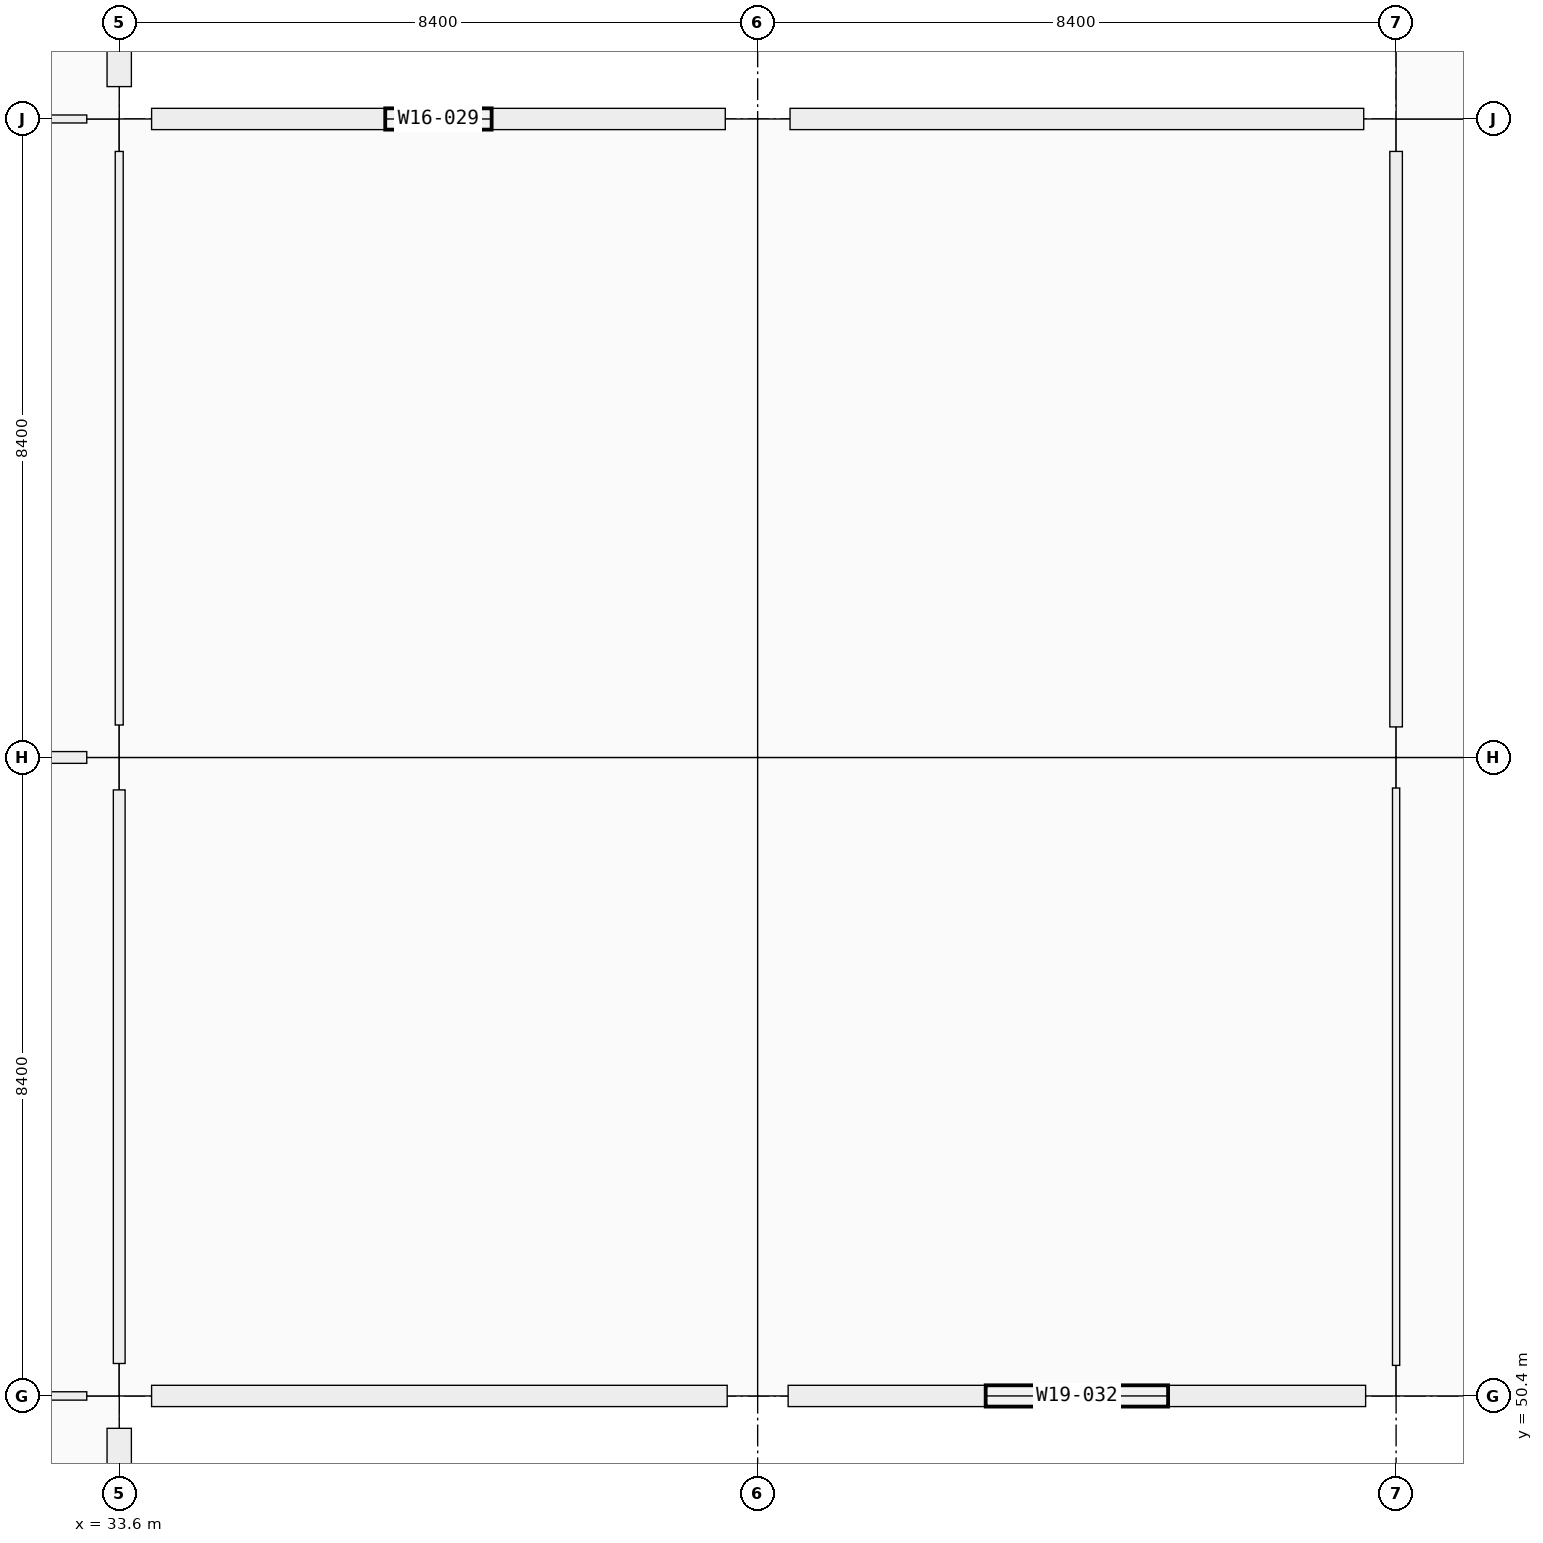
"""IFC4 building model, lengths in metres.
Left out: names, types, materials, properties, quantities, classifications, styles, units other than length and angle.
Written with IfcOpenShell. Run it as: python <this file> out.ifc"""

import sys

from ifc_helpers import new_model, si_unit, direction, frame, frame_2d, origin, origin_2d, place, context, subcontext, project, spatial, rectangle, extrude, element, fill, save


model = new_model("IFC4")
c1 = context("Model", 3, precision=1e-05, world=origin(), true_north=direction((0.0, 1.0)))
c2 = subcontext(c1, "Body", "Model", "MODEL_VIEW")
j1 = project(units=[si_unit("LENGTHUNIT", "METRE"), si_unit("PLANEANGLEUNIT", "RADIAN")], contexts=[c1])
p1 = place(None, origin())
s1 = spatial("IfcSite", under=j1, at=p1, CompositionType="ELEMENT")
p2 = place(p1, origin())
s2 = spatial("IfcBuilding", under=s1, at=p2, CompositionType="ELEMENT")
p3 = place(p2, origin())
s3 = spatial("IfcBuildingStorey", under=s2, at=p3, CompositionType="ELEMENT", Elevation=0.0)
for number, where, z_axis, x_axis in (
    (1, (33.6, 50.4, 0.0), (0.0, 0.0, 1.0), (1.0, 0.0, 0.0)),
    (2, (33.6, 58.8, 0.0), (0.0, 0.0, 1.0), (1.0, 0.0, 0.0)),
    (3, (33.6, 67.2, 0.0), (0.0, 0.0, 1.0), (1.0, 0.0, 0.0)),
):
    element("IfcColumn", number, at=place(p3, frame(where, z_axis=z_axis, x_axis=x_axis)), inside=s3, PredefinedType="COLUMN", context=c2, shape_type="SweptSolid", body=[
        extrude(rectangle(XDim=0.85, YDim=0.85, at=origin_2d()), origin(), (0.0, 0.0, 1.0), 5.76),
    ])
for number, where, z_axis, x_axis in (
    (4, (42.0, 50.4, 0.0), (0.0, 0.0, 1.0), (1.0, 0.0, 0.0)),
    (5, (42.0, 58.8, 0.0), (0.0, 0.0, 1.0), (1.0, 0.0, 0.0)),
):
    element("IfcColumn", number, at=place(p3, frame(where, z_axis=z_axis, x_axis=x_axis)), inside=s3, PredefinedType="COLUMN", context=c2, shape_type="SweptSolid", body=[
        extrude(rectangle(XDim=0.8, YDim=0.8, at=origin_2d()), origin(), (0.0, 0.0, 1.0), 5.76),
    ])
p4 = place(p3, frame((42.0, 67.2, 0.0), z_axis=(0.0, 0.0, 1.0), x_axis=(1.0, 0.0, 0.0)))
e6 = element("IfcColumn", 6, at=p4, inside=s3, PredefinedType="COLUMN", context=c2, shape_type="SweptSolid", body=[
    extrude(rectangle(XDim=0.85, YDim=0.85, at=origin_2d()), origin(), (0.0, 0.0, 1.0), 5.76),
])
for number, where, z_axis, x_axis in (
    (7, (50.4, 50.4, 0.0), (0.0, 0.0, 1.0), (1.0, 0.0, 0.0)),
    (8, (50.4, 58.8, 0.0), (0.0, 0.0, 1.0), (1.0, 0.0, 0.0)),
):
    element("IfcColumn", number, at=place(p3, frame(where, z_axis=z_axis, x_axis=x_axis)), inside=s3, PredefinedType="COLUMN", context=c2, shape_type="SweptSolid", body=[
        extrude(rectangle(XDim=0.8, YDim=0.8, at=origin_2d()), origin(), (0.0, 0.0, 1.0), 5.76),
    ])
p5 = place(p3, frame((50.4, 67.2, 0.0), z_axis=(0.0, 0.0, 1.0), x_axis=(1.0, 0.0, 0.0)))
e9 = element("IfcColumn", 9, at=p5, inside=s3, PredefinedType="COLUMN", context=c2, shape_type="SweptSolid", body=[
    extrude(rectangle(XDim=0.85, YDim=0.85, at=origin_2d()), origin(), (0.0, 0.0, 1.0), 5.76),
])
p6 = place(p3, frame((33.6, 49.974, 0.0), z_axis=(0.0, 0.0, 1.0), x_axis=(0.0, -1.0, 0.0)))
e10 = element("IfcWall", 10, at=p6, inside=s3, PredefinedType="SOLIDWALL", context=c2, shape_type="SweptSolid", body=[
    extrude(rectangle(XDim=7.548, YDim=0.32, at=frame_2d((3.774, 0.0))), origin(), (0.0, 0.0, 1.0), 4.7),
])
p7 = place(p6, frame((2.674, 0.0, 0.9)))
e11 = element("IfcOpeningElement", 11, at=p7, cuts=e10, PredefinedType="OPENING", context=c2, shape_type="SweptSolid", body=[
    extrude(rectangle(XDim=2.2, YDim=1.75, at=frame_2d((1.1, 0.875))), frame((0.0, 0.16, 0.0), z_axis=(0.0, -1.0, 0.0), x_axis=(1.0, 0.0, 0.0)), (0.0, 0.0, 1.0), 0.32),
])
p8 = place(p3, frame((33.6, 75.174, 0.0), z_axis=(0.0, 0.0, 1.0), x_axis=(0.0, -1.0, 0.0)))
e12 = element("IfcWall", 12, at=p8, inside=s3, PredefinedType="SOLIDWALL", context=c2, shape_type="SweptSolid", body=[
    extrude(rectangle(XDim=7.548, YDim=0.32, at=frame_2d((3.774, 0.0))), origin(), (0.0, 0.0, 1.0), 4.7),
])
p9 = place(p8, frame((2.824, 0.0, 0.9)))
e13 = element("IfcOpeningElement", 13, at=p9, cuts=e12, PredefinedType="OPENING", context=c2, shape_type="SweptSolid", body=[
    extrude(rectangle(XDim=1.9, YDim=1.75, at=frame_2d((0.95, 0.875))), frame((0.0, 0.16, 0.0), z_axis=(0.0, -1.0, 0.0), x_axis=(1.0, 0.0, 0.0)), (0.0, 0.0, 1.0), 0.32),
])
p10 = place(p3, frame((41.599, 50.4, 0.0), z_axis=(0.0, 0.0, 1.0), x_axis=(-1.0, 0.0, 0.0)))
e14 = element("IfcWall", 14, at=p10, inside=s3, PredefinedType="SOLIDWALL", context=c2, shape_type="SweptSolid", body=[
    extrude(rectangle(XDim=7.573, YDim=0.28, at=frame_2d((3.787, 0.0))), origin(), (0.0, 0.0, 1.0), 4.7),
])
p11 = place(p3, frame((34.026, 67.2, 0.0), z_axis=(0.0, 0.0, 1.0), x_axis=(1.0, 0.0, 0.0)))
e15 = element("IfcWall", 15, at=p11, inside=s3, PredefinedType="SOLIDWALL", context=c2, shape_type="SweptSolid", body=[
    extrude(rectangle(XDim=7.548, YDim=0.28, at=frame_2d((3.774, 0.0))), origin(), (0.0, 0.0, 1.0), 4.7),
])
p12 = place(p11, frame((3.074, 0.0, 0.9)))
e16 = element("IfcOpeningElement", 16, at=p12, cuts=e15, PredefinedType="OPENING", context=c2, shape_type="SweptSolid", body=[
    extrude(rectangle(XDim=1.4, YDim=1.75, at=frame_2d((0.7, 0.875))), frame((0.0, 0.14, 0.0), z_axis=(0.0, -1.0, 0.0), x_axis=(1.0, 0.0, 0.0)), (0.0, 0.0, 1.0), 0.28),
])
p13 = place(p3, frame((49.999, 50.4, 0.0), z_axis=(0.0, 0.0, 1.0), x_axis=(-1.0, 0.0, 0.0)))
e17 = element("IfcWall", 17, at=p13, inside=s3, PredefinedType="SOLIDWALL", context=c2, shape_type="SweptSolid", body=[
    extrude(rectangle(XDim=7.598, YDim=0.28, at=frame_2d((3.799, 0.0))), origin(), (0.0, 0.0, 1.0), 4.7),
])
p14 = place(p13, frame((2.599, 0.0, 0.9)))
e18 = element("IfcOpeningElement", 18, at=p14, cuts=e17, PredefinedType="OPENING", context=c2, shape_type="SweptSolid", body=[
    extrude(rectangle(XDim=2.4, YDim=2.25, at=frame_2d((1.2, 1.125))), frame((0.0, 0.14, 0.0), z_axis=(0.0, -1.0, 0.0), x_axis=(1.0, 0.0, 0.0)), (0.0, 0.0, 1.0), 0.28),
])
p15 = place(p3, frame((42.426, 67.2, 0.0), z_axis=(0.0, 0.0, 1.0), x_axis=(1.0, 0.0, 0.0)))
e19 = element("IfcWall", 19, at=p15, inside=s3, PredefinedType="SOLIDWALL", context=c2, shape_type="SweptSolid", body=[
    extrude(rectangle(XDim=7.548, YDim=0.28, at=frame_2d((3.774, 0.0))), origin(), (0.0, 0.0, 1.0), 4.7),
])
p16 = place(p15, frame((2.774, 0.0, 0.9)))
e20 = element("IfcOpeningElement", 20, at=p16, cuts=e19, PredefinedType="OPENING", context=c2, shape_type="SweptSolid", body=[
    extrude(rectangle(XDim=2.0, YDim=2.25, at=frame_2d((1.0, 1.125))), frame((0.0, 0.14, 0.0), z_axis=(0.0, -1.0, 0.0), x_axis=(1.0, 0.0, 0.0)), (0.0, 0.0, 1.0), 0.28),
])
p17 = place(p3, frame((25.627, 50.4, 0.0), z_axis=(0.0, 0.0, 1.0), x_axis=(1.0, 0.0, 0.0)))
e21 = element("IfcWall", 21, at=p17, inside=s3, PredefinedType="MOVABLE", context=c2, shape_type="SweptSolid", body=[
    extrude(rectangle(XDim=7.546, YDim=0.11, at=frame_2d((3.773, 0.0))), origin(), (0.0, 0.0, 1.0), 3.66),
])
p18 = place(p17, frame((3.233, 0.0, 0.0)))
e22 = element("IfcOpeningElement", 22, at=p18, cuts=e21, PredefinedType="OPENING", context=c2, shape_type="SweptSolid", body=[
    extrude(rectangle(XDim=1.08, YDim=2.25, at=frame_2d((0.54, 1.125))), frame((0.0, 0.055, 0.0), z_axis=(0.0, -1.0, 0.0), x_axis=(1.0, 0.0, 0.0)), (0.0, 0.0, 1.0), 0.11),
])
p19 = place(p3, frame((25.627, 58.8, 0.0), z_axis=(0.0, 0.0, 1.0), x_axis=(1.0, 0.0, 0.0)))
e23 = element("IfcWall", 23, at=p19, inside=s3, PredefinedType="PARTITIONING", context=c2, shape_type="SweptSolid", body=[
    extrude(rectangle(XDim=7.546, YDim=0.155, at=frame_2d((3.773, 0.0))), origin(), (0.0, 0.0, 1.0), 3.66),
])
p20 = place(p19, frame((3.243, 0.0, 0.0)))
e24 = element("IfcOpeningElement", 24, at=p20, cuts=e23, PredefinedType="OPENING", context=c2, shape_type="SweptSolid", body=[
    extrude(rectangle(XDim=1.06, YDim=2.25, at=frame_2d((0.53, 1.125))), frame((0.0, 0.078, 0.0), z_axis=(0.0, -1.0, 0.0), x_axis=(1.0, 0.0, 0.0)), (0.0, 0.0, 1.0), 0.155),
])
p21 = place(p3, frame((25.627, 67.2, 0.0), z_axis=(0.0, 0.0, 1.0), x_axis=(1.0, 0.0, 0.0)))
e25 = element("IfcWall", 25, at=p21, inside=s3, PredefinedType="PARTITIONING", context=c2, shape_type="SweptSolid", body=[
    extrude(rectangle(XDim=7.546, YDim=0.105, at=frame_2d((3.773, 0.0))), origin(), (0.0, 0.0, 1.0), 3.66),
])
p22 = place(p21, frame((3.248, 0.0, 0.0)))
e26 = element("IfcOpeningElement", 26, at=p22, cuts=e25, PredefinedType="OPENING", context=c2, shape_type="SweptSolid", body=[
    extrude(rectangle(XDim=1.05, YDim=2.12, at=frame_2d((0.525, 1.06))), frame((0.0, 0.052, 0.0), z_axis=(0.0, -1.0, 0.0), x_axis=(1.0, 0.0, 0.0)), (0.0, 0.0, 1.0), 0.105),
])
p23 = place(p3, frame((33.6, 50.827, 0.0), z_axis=(0.0, 0.0, 1.0), x_axis=(0.0, 1.0, 0.0)))
e27 = element("IfcWall", 27, at=p23, inside=s3, PredefinedType="PARTITIONING", context=c2, shape_type="SweptSolid", body=[
    extrude(rectangle(XDim=7.546, YDim=0.155, at=frame_2d((3.773, 0.0))), origin(), (0.0, 0.0, 1.0), 3.66),
])
p24 = place(p23, frame((3.048, 0.0, 0.0)))
e28 = element("IfcOpeningElement", 28, at=p24, cuts=e27, PredefinedType="OPENING", context=c2, shape_type="SweptSolid", body=[
    extrude(rectangle(XDim=1.45, YDim=2.2, at=frame_2d((0.725, 1.1))), frame((0.0, 0.078, 0.0), z_axis=(0.0, -1.0, 0.0), x_axis=(1.0, 0.0, 0.0)), (0.0, 0.0, 1.0), 0.155),
])
p25 = place(p3, frame((33.6, 59.227, 0.0), z_axis=(0.0, 0.0, 1.0), x_axis=(0.0, 1.0, 0.0)))
e29 = element("IfcWall", 29, at=p25, inside=s3, PredefinedType="PARTITIONING", context=c2, shape_type="SweptSolid", body=[
    extrude(rectangle(XDim=7.546, YDim=0.105, at=frame_2d((3.773, 0.0))), origin(), (0.0, 0.0, 1.0), 3.66),
])
p26 = place(p25, frame((3.073, 0.0, 0.0)))
e30 = element("IfcOpeningElement", 30, at=p26, cuts=e29, PredefinedType="OPENING", context=c2, shape_type="SweptSolid", body=[
    extrude(rectangle(XDim=1.4, YDim=2.25, at=frame_2d((0.7, 1.125))), frame((0.0, 0.052, 0.0), z_axis=(0.0, -1.0, 0.0), x_axis=(1.0, 0.0, 0.0)), (0.0, 0.0, 1.0), 0.105),
])
p27 = place(p3, frame((50.4, 50.802, 0.0), z_axis=(0.0, 0.0, 1.0), x_axis=(0.0, 1.0, 0.0)))
e31 = element("IfcWall", 31, at=p27, inside=s3, PredefinedType="PARTITIONING", context=c2, shape_type="SweptSolid", body=[
    extrude(rectangle(XDim=7.596, YDim=0.095, at=frame_2d((3.798, 0.0))), origin(), (0.0, 0.0, 1.0), 3.66),
])
p28 = place(p27, frame((3.123, 0.0, 0.0)))
e32 = element("IfcOpeningElement", 32, at=p28, cuts=e31, PredefinedType="OPENING", context=c2, shape_type="SweptSolid", body=[
    extrude(rectangle(XDim=1.35, YDim=2.2, at=frame_2d((0.675, 1.1))), frame((0.0, 0.047, 0.0), z_axis=(0.0, -1.0, 0.0), x_axis=(1.0, 0.0, 0.0)), (0.0, 0.0, 1.0), 0.095),
])
p29 = place(p3, frame((50.4, 59.202, 0.0), z_axis=(0.0, 0.0, 1.0), x_axis=(0.0, 1.0, 0.0)))
e33 = element("IfcWall", 33, at=p29, inside=s3, PredefinedType="PARTITIONING", context=c2, shape_type="SweptSolid", body=[
    extrude(rectangle(XDim=7.571, YDim=0.165, at=frame_2d((3.786, 0.0))), origin(), (0.0, 0.0, 1.0), 3.66),
])
p30 = place(p29, frame((2.885, 0.0, 0.0)))
e34 = element("IfcOpeningElement", 34, at=p30, cuts=e33, PredefinedType="OPENING", context=c2, shape_type="SweptSolid", body=[
    extrude(rectangle(XDim=1.8, YDim=2.4, at=frame_2d((0.9, 1.2))), frame((0.0, 0.083, 0.0), z_axis=(0.0, -1.0, 0.0), x_axis=(1.0, 0.0, 0.0)), (0.0, 0.0, 1.0), 0.165),
])
p31 = place(p12, origin())
e35 = element("IfcWindow", 35, at=p31, inside=s3, PartitioningType="SINGLE_PANEL", PredefinedType="WINDOW", context=c2, shape_type="SweptSolid", body=[
    extrude(rectangle(XDim=1.4, YDim=1.75, at=frame_2d((0.7, 0.875))), frame((0.0, 0.03, 0.0), z_axis=(0.0, -1.0, 0.0), x_axis=(1.0, 0.0, 0.0)), (0.0, 0.0, 1.0), 0.06),
])
fill(e16, e35)
p32 = place(p14, origin())
e36 = element("IfcWindow", 36, at=p32, inside=s3, PartitioningType="SINGLE_PANEL", PredefinedType="WINDOW", context=c2, shape_type="SweptSolid", body=[
    extrude(rectangle(XDim=2.4, YDim=2.25, at=frame_2d((1.2, 1.125))), frame((0.0, 0.03, 0.0), z_axis=(0.0, -1.0, 0.0), x_axis=(1.0, 0.0, 0.0)), (0.0, 0.0, 1.0), 0.06),
])
fill(e18, e36)
p33 = place(p16, origin())
e37 = element("IfcWindow", 37, at=p33, inside=s3, PartitioningType="SINGLE_PANEL", PredefinedType="WINDOW", context=c2, shape_type="SweptSolid", body=[
    extrude(rectangle(XDim=2.0, YDim=2.25, at=frame_2d((1.0, 1.125))), frame((0.0, 0.03, 0.0), z_axis=(0.0, -1.0, 0.0), x_axis=(1.0, 0.0, 0.0)), (0.0, 0.0, 1.0), 0.06),
])
fill(e20, e37)
p34 = place(p24, origin())
e38 = element("IfcDoor", 38, at=p34, inside=s3, OperationType="DOUBLE_DOOR_SINGLE_SWING", PredefinedType="DOOR", context=c2, shape_type="SweptSolid", body=[
    extrude(rectangle(XDim=1.45, YDim=2.2, at=frame_2d((0.725, 1.1))), frame((0.0, 0.025, 0.0), z_axis=(0.0, -1.0, 0.0), x_axis=(1.0, 0.0, 0.0)), (0.0, 0.0, 1.0), 0.05),
])
fill(e28, e38)
p35 = place(p26, origin())
e39 = element("IfcDoor", 39, at=p35, inside=s3, OperationType="DOUBLE_DOOR_SINGLE_SWING", PredefinedType="DOOR", context=c2, shape_type="SweptSolid", body=[
    extrude(rectangle(XDim=1.4, YDim=2.25, at=frame_2d((0.7, 1.125))), frame((0.0, 0.025, 0.0), z_axis=(0.0, -1.0, 0.0), x_axis=(1.0, 0.0, 0.0)), (0.0, 0.0, 1.0), 0.05),
])
fill(e30, e39)
p36 = place(p28, origin())
e40 = element("IfcDoor", 40, at=p36, inside=s3, OperationType="DOUBLE_DOOR_SINGLE_SWING", PredefinedType="DOOR", context=c2, shape_type="SweptSolid", body=[
    extrude(rectangle(XDim=1.35, YDim=2.2, at=frame_2d((0.675, 1.1))), frame((0.0, 0.025, 0.0), z_axis=(0.0, -1.0, 0.0), x_axis=(1.0, 0.0, 0.0)), (0.0, 0.0, 1.0), 0.05),
])
fill(e32, e40)
p37 = place(p30, origin())
e41 = element("IfcDoor", 41, at=p37, inside=s3, OperationType="DOUBLE_DOOR_SINGLE_SWING", PredefinedType="DOOR", context=c2, shape_type="SweptSolid", body=[
    extrude(rectangle(XDim=1.8, YDim=2.4, at=frame_2d((0.9, 1.2))), frame((0.0, 0.025, 0.0), z_axis=(0.0, -1.0, 0.0), x_axis=(1.0, 0.0, 0.0)), (0.0, 0.0, 1.0), 0.05),
])
fill(e34, e41)
save(model, sys.argv[1])
